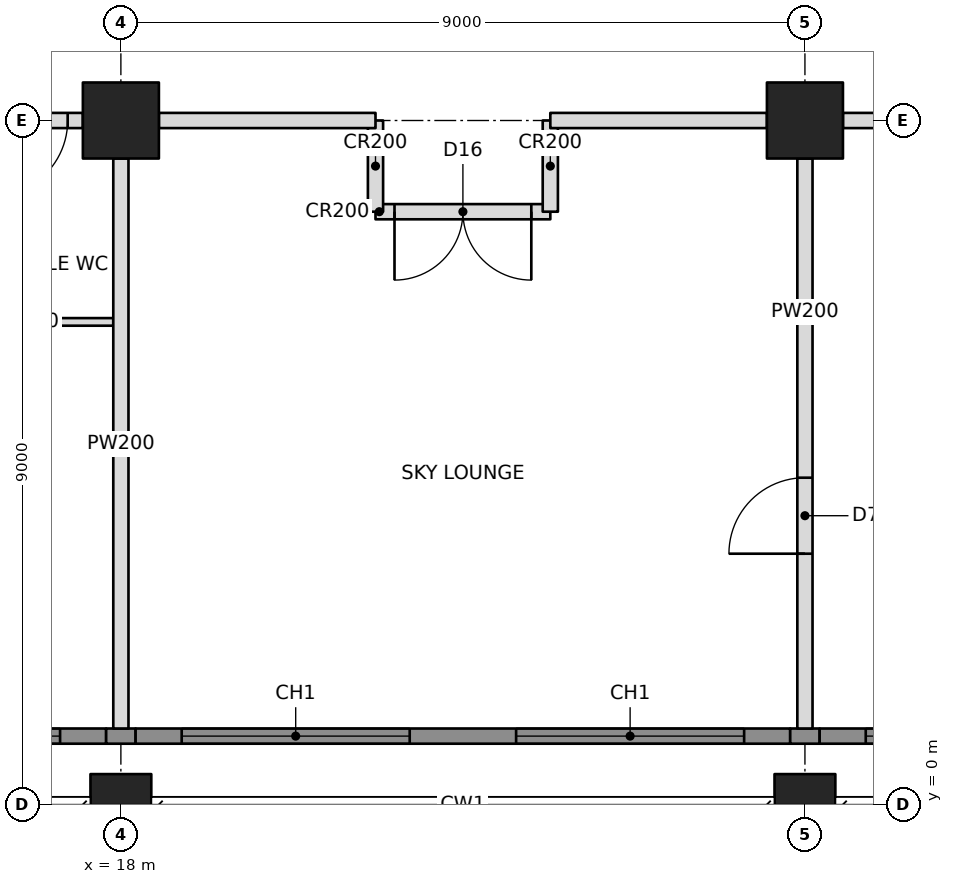
"""IFC4 building model, lengths in metres.
Left out: names, types, materials, properties, quantities, classifications, styles, units other than length and angle.
Written with IfcOpenShell. Run it as: python <this file> out.ifc"""

import sys

from ifc_helpers import new_model, si_unit, direction, frame, frame_2d, origin, origin_2d, place, context, subcontext, project, spatial, rectangle, hollow_rectangle, extrude, element, fill, save


model = new_model("IFC4")
c1 = context("Model", 3, precision=1e-05, world=origin(), true_north=direction((0.0, 1.0)))
c2 = subcontext(c1, "Body", "Model", "MODEL_VIEW")
j1 = project(units=[si_unit("LENGTHUNIT", "METRE"), si_unit("PLANEANGLEUNIT", "RADIAN")], contexts=[c1])
p1 = place(None, origin())
s1 = spatial("IfcSite", under=j1, at=p1, CompositionType="ELEMENT")
p2 = place(p1, origin())
s2 = spatial("IfcBuilding", under=s1, at=p2, CompositionType="ELEMENT")
p3 = place(p2, frame((0.0, 0.0, 94.2)))
s3 = spatial("IfcBuildingStorey", under=s2, at=p3, CompositionType="ELEMENT", Elevation=94.2)
p4 = place(p3, frame((18.0, 0.0, 0.0), z_axis=(0.0, 0.0, 1.0), x_axis=(1.0, 0.0, 0.0)))
e1 = element("IfcColumn", 1, at=p4, inside=s3, PredefinedType="COLUMN", context=c2, shape_type="SweptSolid", body=[
    extrude(hollow_rectangle(XDim=0.8, YDim=0.8, WallThickness=0.07, at=origin_2d()), origin(), (0.0, 0.0, 1.0), 3.4),
])
p5 = place(p3, frame((18.0, 9.0, 0.0), z_axis=(0.0, 0.0, 1.0), x_axis=(1.0, 0.0, 0.0)))
e2 = element("IfcColumn", 2, at=p5, inside=s3, PredefinedType="COLUMN", context=c2, shape_type="SweptSolid", body=[
    extrude(hollow_rectangle(XDim=1.0, YDim=1.0, WallThickness=0.1, at=origin_2d()), origin(), (0.0, 0.0, 1.0), 3.4),
])
p6 = place(p3, frame((27.0, 0.0, 0.0), z_axis=(0.0, 0.0, 1.0), x_axis=(1.0, 0.0, 0.0)))
e3 = element("IfcColumn", 3, at=p6, inside=s3, PredefinedType="COLUMN", context=c2, shape_type="SweptSolid", body=[
    extrude(hollow_rectangle(XDim=0.8, YDim=0.8, WallThickness=0.07, at=origin_2d()), origin(), (0.0, 0.0, 1.0), 3.4),
])
p7 = place(p3, frame((27.0, 9.0, 0.0), z_axis=(0.0, 0.0, 1.0), x_axis=(1.0, 0.0, 0.0)))
e4 = element("IfcColumn", 4, at=p7, inside=s3, PredefinedType="COLUMN", context=c2, shape_type="SweptSolid", body=[
    extrude(hollow_rectangle(XDim=1.0, YDim=1.0, WallThickness=0.1, at=origin_2d()), origin(), (0.0, 0.0, 1.0), 3.4),
])
p8 = place(p3, frame((9.5, 9.0, 0.0), z_axis=(0.0, 0.0, 1.0), x_axis=(1.0, 0.0, 0.0)))
e5 = element("IfcWall", 5, at=p8, inside=s3, PredefinedType="PARTITIONING", context=c2, shape_type="SweptSolid", body=[
    extrude(rectangle(XDim=8.0, YDim=0.2, at=frame_2d((4.0, 0.0))), origin(), (0.0, 0.0, 1.0), 2.405),
])
p9 = place(p8, frame((2.75, 0.0, 0.0)))
e6 = element("IfcOpeningElement", 6, at=p9, cuts=e5, PredefinedType="OPENING", context=c2, shape_type="SweptSolid", body=[
    extrude(rectangle(XDim=1.0, YDim=2.1, at=frame_2d((0.5, 1.05))), frame((0.0, 0.11, 0.0), z_axis=(0.0, -1.0, 0.0), x_axis=(1.0, 0.0, 0.0)), (0.0, 0.0, 1.0), 0.22),
])
p10 = place(p8, frame((6.8, 0.0, 0.0)))
e7 = element("IfcOpeningElement", 7, at=p10, cuts=e5, PredefinedType="OPENING", context=c2, shape_type="SweptSolid", body=[
    extrude(rectangle(XDim=1.0, YDim=2.1, at=frame_2d((0.5, 1.05))), frame((0.0, 0.11, 0.0), z_axis=(0.0, -1.0, 0.0), x_axis=(1.0, 0.0, 0.0)), (0.0, 0.0, 1.0), 0.22),
])
p11 = place(p8, frame((4.25, 0.0, 0.0)))
e8 = element("IfcOpeningElement", 8, at=p11, cuts=e5, PredefinedType="OPENING", context=c2, shape_type="SweptSolid", body=[
    extrude(rectangle(XDim=1.0, YDim=2.1, at=frame_2d((0.5, 1.05))), frame((0.0, 0.11, 0.0), z_axis=(0.0, -1.0, 0.0), x_axis=(1.0, 0.0, 0.0)), (0.0, 0.0, 1.0), 0.22),
])
p12 = place(p3, frame((18.5, 9.0, 0.0), z_axis=(0.0, 0.0, 1.0), x_axis=(1.0, 0.0, 0.0)))
e9 = element("IfcWall", 9, at=p12, inside=s3, PredefinedType="PARTITIONING", context=c2, shape_type="SweptSolid", body=[
    extrude(rectangle(XDim=2.85, YDim=0.2, at=frame_2d((1.425, 0.0))), origin(), (0.0, 0.0, 1.0), 2.405),
])
p13 = place(p3, frame((27.5, 9.0, 0.0), z_axis=(0.0, 0.0, 1.0), x_axis=(1.0, 0.0, 0.0)))
e10 = element("IfcWall", 10, at=p13, inside=s3, PredefinedType="PARTITIONING", context=c2, shape_type="SweptSolid", body=[
    extrude(rectangle(XDim=8.0, YDim=0.2, at=frame_2d((4.0, 0.0))), origin(), (0.0, 0.0, 1.0), 2.405),
])
p14 = place(p13, frame((0.85, 0.0, 0.0)))
e11 = element("IfcOpeningElement", 11, at=p14, cuts=e10, PredefinedType="OPENING", context=c2, shape_type="SweptSolid", body=[
    extrude(rectangle(XDim=1.8, YDim=2.4, at=frame_2d((0.9, 1.2))), frame((0.0, 0.11, 0.0), z_axis=(0.0, -1.0, 0.0), x_axis=(1.0, 0.0, 0.0)), (0.0, 0.0, 1.0), 0.22),
])
p15 = place(p13, frame((5.35, 0.0, 0.0)))
e12 = element("IfcOpeningElement", 12, at=p15, cuts=e10, PredefinedType="OPENING", context=c2, shape_type="SweptSolid", body=[
    extrude(rectangle(XDim=1.8, YDim=2.4, at=frame_2d((0.9, 1.2))), frame((0.0, 0.11, 0.0), z_axis=(0.0, -1.0, 0.0), x_axis=(1.0, 0.0, 0.0)), (0.0, 0.0, 1.0), 0.22),
])
p16 = place(p3, frame((18.0, 8.5, 0.0), z_axis=(0.0, 0.0, 1.0), x_axis=(0.0, -1.0, 0.0)))
e13 = element("IfcWall", 13, at=p16, inside=s3, PredefinedType="PARTITIONING", context=c2, shape_type="SweptSolid", body=[
    extrude(rectangle(XDim=7.5, YDim=0.2, at=frame_2d((3.75, 0.0))), origin(), (0.0, 0.0, 1.0), 2.405),
])
p17 = place(p3, frame((27.0, 8.5, 0.0), z_axis=(0.0, 0.0, 1.0), x_axis=(0.0, -1.0, 0.0)))
e14 = element("IfcWall", 14, at=p17, inside=s3, PredefinedType="PARTITIONING", context=c2, shape_type="SweptSolid", body=[
    extrude(rectangle(XDim=7.5, YDim=0.2, at=frame_2d((3.75, 0.0))), origin(), (0.0, 0.0, 1.0), 2.405),
])
p18 = place(p17, frame((4.2, 0.0, 0.0)))
e15 = element("IfcOpeningElement", 15, at=p18, cuts=e14, PredefinedType="OPENING", context=c2, shape_type="SweptSolid", body=[
    extrude(rectangle(XDim=1.0, YDim=2.1, at=frame_2d((0.5, 1.05))), frame((0.0, 0.11, 0.0), z_axis=(0.0, -1.0, 0.0), x_axis=(1.0, 0.0, 0.0)), (0.0, 0.0, 1.0), 0.22),
])
p19 = place(p3, frame((15.65, 6.35, 0.0), z_axis=(0.0, 0.0, 1.0), x_axis=(1.0, 0.0, 0.0)))
e16 = element("IfcWall", 16, at=p19, inside=s3, PredefinedType="PARTITIONING", context=c2, shape_type="SweptSolid", body=[
    extrude(rectangle(XDim=2.25, YDim=0.1, at=frame_2d((1.125, 0.0))), origin(), (0.0, 0.0, 1.0), 2.404),
])
p20 = place(p3, frame((23.65, 9.0, 0.0), z_axis=(0.0, 0.0, 1.0), x_axis=(1.0, 0.0, 0.0)))
e17 = element("IfcWall", 17, at=p20, inside=s3, PredefinedType="PARTITIONING", context=c2, shape_type="SweptSolid", body=[
    extrude(rectangle(XDim=2.85, YDim=0.2, at=frame_2d((1.425, 0.0))), origin(), (0.0, 0.0, 1.0), 2.405),
])
for number, where, z_axis, x_axis in (
    (18, (21.35, 9.0, 0.0), (0.0, 0.0, 1.0), (0.0, -1.0, 0.0)),
    (19, (23.65, 9.0, 0.0), (0.0, 0.0, 1.0), (0.0, -1.0, 0.0)),
):
    element("IfcWall", number, at=place(p3, frame(where, z_axis=z_axis, x_axis=x_axis)), inside=s3, PredefinedType="PARTITIONING", context=c2, shape_type="SweptSolid", body=[
        extrude(rectangle(XDim=1.2, YDim=0.2, at=frame_2d((0.6, 0.0))), origin(), (0.0, 0.0, 1.0), 2.404),
    ])
p21 = place(p3, frame((21.35, 7.8, 0.0), z_axis=(0.0, 0.0, 1.0), x_axis=(1.0, 0.0, 0.0)))
e20 = element("IfcWall", 20, at=p21, inside=s3, PredefinedType="PARTITIONING", context=c2, shape_type="SweptSolid", body=[
    extrude(rectangle(XDim=2.3, YDim=0.2, at=frame_2d((1.15, 0.0))), origin(), (0.0, 0.0, 1.0), 3.2),
])
p22 = place(p21, frame((0.25, 0.0, 0.0)))
e21 = element("IfcOpeningElement", 21, at=p22, cuts=e20, PredefinedType="OPENING", context=c2, shape_type="SweptSolid", body=[
    extrude(rectangle(XDim=1.8, YDim=2.4, at=frame_2d((0.9, 1.2))), frame((0.0, 0.11, 0.0), z_axis=(0.0, -1.0, 0.0), x_axis=(1.0, 0.0, 0.0)), (0.0, 0.0, 1.0), 0.22),
])
p23 = place(p3, frame((9.135, 0.9, 0.0), z_axis=(0.0, 0.0, 1.0), x_axis=(1.0, 0.0, 0.0)))
e22 = element("IfcWall", 22, at=p23, inside=s3, PredefinedType="SOLIDWALL", context=c2, shape_type="SweptSolid", body=[
    extrude(rectangle(XDim=8.671, YDim=0.2, at=frame_2d((4.335, 0.0))), origin(), (0.0, 0.0, 1.0), 3.2),
])
p24 = place(p23, frame((0.665, 0.0, 0.6)))
e23 = element("IfcOpeningElement", 23, at=p24, cuts=e22, PredefinedType="OPENING", context=c2, shape_type="SweptSolid", body=[
    extrude(rectangle(XDim=3.0, YDim=2.2, at=frame_2d((1.5, 1.1))), frame((0.0, 0.11, 0.0), z_axis=(0.0, -1.0, 0.0), x_axis=(1.0, 0.0, 0.0)), (0.0, 0.0, 1.0), 0.22),
])
p25 = place(p23, frame((5.065, 0.0, 0.6)))
e24 = element("IfcOpeningElement", 24, at=p25, cuts=e22, PredefinedType="OPENING", context=c2, shape_type="SweptSolid", body=[
    extrude(rectangle(XDim=3.0, YDim=2.2, at=frame_2d((1.5, 1.1))), frame((0.0, 0.11, 0.0), z_axis=(0.0, -1.0, 0.0), x_axis=(1.0, 0.0, 0.0)), (0.0, 0.0, 1.0), 0.22),
])
p26 = place(p3, frame((17.806, 0.9, 0.0), z_axis=(0.0, 0.0, 1.0), x_axis=(1.0, 0.0, 0.0)))
e25 = element("IfcWall", 25, at=p26, inside=s3, PredefinedType="SOLIDWALL", context=c2, shape_type="SweptSolid", body=[
    extrude(rectangle(XDim=0.388, YDim=0.2, at=frame_2d((0.194, 0.0))), origin(), (0.0, 0.0, 1.0), 2.404),
])
p27 = place(p3, frame((18.194, 0.9, 0.0), z_axis=(0.0, 0.0, 1.0), x_axis=(1.0, 0.0, 0.0)))
e26 = element("IfcWall", 26, at=p27, inside=s3, PredefinedType="SOLIDWALL", context=c2, shape_type="SweptSolid", body=[
    extrude(rectangle(XDim=8.612, YDim=0.2, at=frame_2d((4.306, 0.0))), origin(), (0.0, 0.0, 1.0), 3.2),
])
p28 = place(p27, frame((0.606, 0.0, 0.6)))
e27 = element("IfcOpeningElement", 27, at=p28, cuts=e26, PredefinedType="OPENING", context=c2, shape_type="SweptSolid", body=[
    extrude(rectangle(XDim=3.0, YDim=2.2, at=frame_2d((1.5, 1.1))), frame((0.0, 0.11, 0.0), z_axis=(0.0, -1.0, 0.0), x_axis=(1.0, 0.0, 0.0)), (0.0, 0.0, 1.0), 0.22),
])
p29 = place(p27, frame((5.006, 0.0, 0.6)))
e28 = element("IfcOpeningElement", 28, at=p29, cuts=e26, PredefinedType="OPENING", context=c2, shape_type="SweptSolid", body=[
    extrude(rectangle(XDim=3.0, YDim=2.2, at=frame_2d((1.5, 1.1))), frame((0.0, 0.11, 0.0), z_axis=(0.0, -1.0, 0.0), x_axis=(1.0, 0.0, 0.0)), (0.0, 0.0, 1.0), 0.22),
])
p30 = place(p3, frame((26.806, 0.9, 0.0), z_axis=(0.0, 0.0, 1.0), x_axis=(1.0, 0.0, 0.0)))
e29 = element("IfcWall", 29, at=p30, inside=s3, PredefinedType="SOLIDWALL", context=c2, shape_type="SweptSolid", body=[
    extrude(rectangle(XDim=0.388, YDim=0.2, at=frame_2d((0.194, 0.0))), origin(), (0.0, 0.0, 1.0), 2.404),
])
p31 = place(p3, frame((27.194, 0.9, 0.0), z_axis=(0.0, 0.0, 1.0), x_axis=(1.0, 0.0, 0.0)))
e30 = element("IfcWall", 30, at=p31, inside=s3, PredefinedType="SOLIDWALL", context=c2, shape_type="SweptSolid", body=[
    extrude(rectangle(XDim=8.671, YDim=0.2, at=frame_2d((4.335, 0.0))), origin(), (0.0, 0.0, 1.0), 3.2),
])
p32 = place(p31, frame((0.606, 0.0, 0.6)))
e31 = element("IfcOpeningElement", 31, at=p32, cuts=e30, PredefinedType="OPENING", context=c2, shape_type="SweptSolid", body=[
    extrude(rectangle(XDim=3.0, YDim=2.2, at=frame_2d((1.5, 1.1))), frame((0.0, 0.11, 0.0), z_axis=(0.0, -1.0, 0.0), x_axis=(1.0, 0.0, 0.0)), (0.0, 0.0, 1.0), 0.22),
])
p33 = place(p31, frame((5.006, 0.0, 0.6)))
e32 = element("IfcOpeningElement", 32, at=p33, cuts=e30, PredefinedType="OPENING", context=c2, shape_type="SweptSolid", body=[
    extrude(rectangle(XDim=3.0, YDim=2.2, at=frame_2d((1.5, 1.1))), frame((0.0, 0.11, 0.0), z_axis=(0.0, -1.0, 0.0), x_axis=(1.0, 0.0, 0.0)), (0.0, 0.0, 1.0), 0.22),
])
p34 = place(p25, origin())
e33 = element("IfcWindow", 33, at=p34, inside=s3, PartitioningType="TRIPLE_PANEL_VERTICAL", PredefinedType="WINDOW", context=c2, shape_type="SweptSolid", body=[
    extrude(rectangle(XDim=3.0, YDim=2.2, at=frame_2d((1.5, 1.1))), frame((0.0, 0.03, 0.0), z_axis=(0.0, -1.0, 0.0), x_axis=(1.0, 0.0, 0.0)), (0.0, 0.0, 1.0), 0.06),
])
fill(e24, e33)
p35 = place(p28, origin())
e34 = element("IfcWindow", 34, at=p35, inside=s3, PartitioningType="TRIPLE_PANEL_VERTICAL", PredefinedType="WINDOW", context=c2, shape_type="SweptSolid", body=[
    extrude(rectangle(XDim=3.0, YDim=2.2, at=frame_2d((1.5, 1.1))), frame((0.0, 0.03, 0.0), z_axis=(0.0, -1.0, 0.0), x_axis=(1.0, 0.0, 0.0)), (0.0, 0.0, 1.0), 0.06),
])
fill(e27, e34)
p36 = place(p29, origin())
e35 = element("IfcWindow", 35, at=p36, inside=s3, PartitioningType="TRIPLE_PANEL_VERTICAL", PredefinedType="WINDOW", context=c2, shape_type="SweptSolid", body=[
    extrude(rectangle(XDim=3.0, YDim=2.2, at=frame_2d((1.5, 1.1))), frame((0.0, 0.03, 0.0), z_axis=(0.0, -1.0, 0.0), x_axis=(1.0, 0.0, 0.0)), (0.0, 0.0, 1.0), 0.06),
])
fill(e28, e35)
p37 = place(p32, origin())
e36 = element("IfcWindow", 36, at=p37, inside=s3, PartitioningType="TRIPLE_PANEL_VERTICAL", PredefinedType="WINDOW", context=c2, shape_type="SweptSolid", body=[
    extrude(rectangle(XDim=3.0, YDim=2.2, at=frame_2d((1.5, 1.1))), frame((0.0, 0.03, 0.0), z_axis=(0.0, -1.0, 0.0), x_axis=(1.0, 0.0, 0.0)), (0.0, 0.0, 1.0), 0.06),
])
fill(e31, e36)
p38 = place(p18, frame((1.0, 0.0, 0.0), z_axis=(0.0, 0.0, 1.0), x_axis=(-1.0, 0.0, 0.0)))
e37 = element("IfcDoor", 37, at=p38, inside=s3, OperationType="SINGLE_SWING_LEFT", PredefinedType="DOOR", context=c2, shape_type="SweptSolid", body=[
    extrude(rectangle(XDim=1.0, YDim=2.1, at=frame_2d((0.5, 1.05))), frame((0.0, 0.025, 0.0), z_axis=(0.0, -1.0, 0.0), x_axis=(1.0, 0.0, 0.0)), (0.0, 0.0, 1.0), 0.05),
])
fill(e15, e37)
p39 = place(p10, frame((1.0, 0.0, 0.0), z_axis=(0.0, 0.0, 1.0), x_axis=(-1.0, 0.0, 0.0)))
e38 = element("IfcDoor", 38, at=p39, inside=s3, OperationType="SINGLE_SWING_RIGHT", PredefinedType="DOOR", context=c2, shape_type="SweptSolid", body=[
    extrude(rectangle(XDim=1.0, YDim=2.1, at=frame_2d((0.5, 1.05))), frame((0.0, 0.025, 0.0), z_axis=(0.0, -1.0, 0.0), x_axis=(1.0, 0.0, 0.0)), (0.0, 0.0, 1.0), 0.05),
])
fill(e7, e38)
p40 = place(p22, frame((1.8, 0.0, 0.0), z_axis=(0.0, 0.0, 1.0), x_axis=(-1.0, 0.0, 0.0)))
e39 = element("IfcDoor", 39, at=p40, inside=s3, OperationType="DOUBLE_DOOR_SINGLE_SWING", PredefinedType="DOOR", context=c2, shape_type="SweptSolid", body=[
    extrude(rectangle(XDim=1.8, YDim=2.4, at=frame_2d((0.9, 1.2))), frame((0.0, 0.025, 0.0), z_axis=(0.0, -1.0, 0.0), x_axis=(1.0, 0.0, 0.0)), (0.0, 0.0, 1.0), 0.05),
])
fill(e21, e39)
save(model, sys.argv[1])
